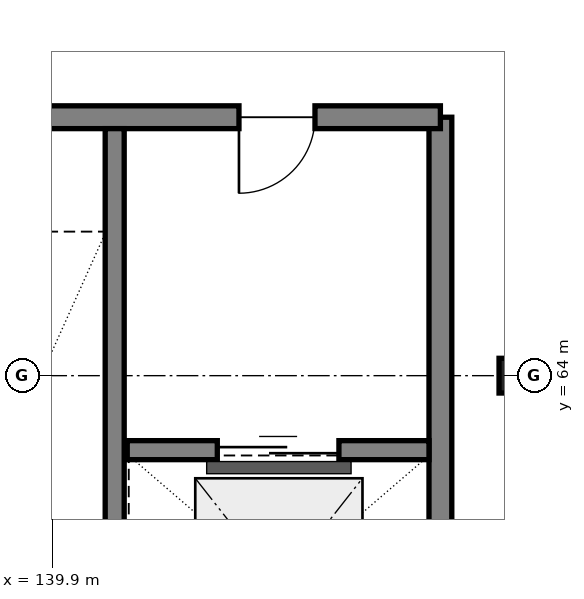
"""IFC4 building model, lengths in metres.
Left out: names, types, materials, properties, quantities, classifications, styles, units other than length and angle.
Written with IfcOpenShell. Run it as: python <this file> out.ifc"""

import sys

from ifc_helpers import new_model, si_unit, direction, frame, frame_2d, origin, origin_2d_with_axis, place, context, subcontext, project, spatial, rectangle, hollow_circle, extrude, element, fill, save


model = new_model("IFC4")
c1 = context("Model", 3, precision=1e-05, world=origin(), true_north=direction((0.0, 1.0)))
c2 = subcontext(c1, "Body", "Model", "MODEL_VIEW")
j1 = project(units=[si_unit("LENGTHUNIT", "METRE"), si_unit("PLANEANGLEUNIT", "RADIAN")], contexts=[c1])
p1 = place(None, origin())
s1 = spatial("IfcSite", under=j1, at=p1, CompositionType="ELEMENT")
p2 = place(p1, origin())
s2 = spatial("IfcBuilding", under=s1, at=p2, CompositionType="ELEMENT")
p3 = place(p2, frame((0.0, 0.0, 8.4)))
s3 = spatial("IfcBuildingStorey", under=s2, at=p3, CompositionType="ELEMENT", Elevation=8.4)
p4 = place(p3, frame((146.0, 64.0, 0.0), z_axis=(0.0, 0.0, 1.0), x_axis=(1.0, 0.0, 0.0)))
e1 = element("IfcColumn", 1, at=p4, inside=s3, PredefinedType="COLUMN", context=c2, shape_type="SweptSolid", body=[
    extrude(hollow_circle(Radius=0.229, WallThickness=0.013, at=origin_2d_with_axis()), origin(), (0.0, 0.0, 1.0), 6.0),
])
p5 = place(p3, frame((145.0, 59.4, 0.0), z_axis=(0.0, 0.0, 1.0), x_axis=(0.0, 1.0, 0.0)))
e2 = element("IfcWall", 2, at=p5, inside=s3, PredefinedType="SHEAR", context=c2, shape_type="SweptSolid", body=[
    extrude(rectangle(XDim=8.0, YDim=0.3, at=frame_2d((4.0, 0.0), x_axis=(1.0, 0.0))), origin(), (0.0, 0.0, 1.0), 3.36),
])
p6 = place(p3, frame((145.0, 67.4, 0.0), z_axis=(0.0, 0.0, 1.0), x_axis=(-1.0, 0.0, 0.0)))
e3 = element("IfcWall", 3, at=p6, inside=s3, PredefinedType="SHEAR", context=c2, shape_type="SweptSolid", body=[
    extrude(rectangle(XDim=7.4, YDim=0.3, at=frame_2d((3.7, 0.0), x_axis=(1.0, 0.0))), origin(), (0.0, 0.0, 1.0), 3.36),
])
p7 = place(p6, frame((1.65, 0.0, 0.0)))
e4 = element("IfcOpeningElement", 4, at=p7, cuts=e3, PredefinedType="OPENING", context=c2, shape_type="SweptSolid", body=[
    extrude(rectangle(XDim=1.0, YDim=2.15, at=frame_2d((0.5, 1.075), x_axis=(1.0, 0.0))), frame((0.0, 0.16, 0.0), z_axis=(0.0, -1.0, 0.0), x_axis=(1.0, 0.0, 0.0)), (0.0, 0.0, 1.0), 0.32),
])
p8 = place(p6, frame((5.3, 0.0, 0.0)))
e5 = element("IfcOpeningElement", 5, at=p8, cuts=e3, PredefinedType="OPENING", context=c2, shape_type="SweptSolid", body=[
    extrude(rectangle(XDim=1.0, YDim=2.15, at=frame_2d((0.5, 1.075), x_axis=(1.0, 0.0))), frame((0.0, 0.16, 0.0), z_axis=(0.0, -1.0, 0.0), x_axis=(1.0, 0.0, 0.0)), (0.0, 0.0, 1.0), 0.32),
])
p9 = place(p3, frame((140.715, 59.55, 0.0), z_axis=(0.0, 0.0, 1.0), x_axis=(0.0, 1.0, 0.0)))
e6 = element("IfcWall", 6, at=p9, inside=s3, PredefinedType="SHEAR", context=c2, shape_type="SweptSolid", body=[
    extrude(rectangle(XDim=7.7, YDim=0.25, at=frame_2d((3.85, 0.0), x_axis=(1.0, 0.0))), origin(), (0.0, 0.0, 1.0), 3.36),
])
p10 = place(p3, frame((140.88, 63.02, 0.0), z_axis=(0.0, 0.0, 1.0), x_axis=(1.0, 0.0, 0.0)))
e7 = element("IfcWall", 7, at=p10, inside=s3, PredefinedType="SHEAR", context=c2, shape_type="SweptSolid", body=[
    extrude(rectangle(XDim=3.97, YDim=0.25, at=frame_2d((1.985, 0.0), x_axis=(1.0, 0.0))), origin(), (0.0, 0.0, 1.0), 3.36),
])
p11 = place(p10, frame((1.185, 0.0, 0.0)))
e8 = element("IfcOpeningElement", 8, at=p11, cuts=e7, PredefinedType="OPENING", context=c2, shape_type="SweptSolid", body=[
    extrude(rectangle(XDim=1.6, YDim=2.3, at=frame_2d((0.8, 1.15), x_axis=(1.0, 0.0))), frame((0.0, 0.135, 0.0), z_axis=(0.0, -1.0, 0.0), x_axis=(1.0, 0.0, 0.0)), (0.0, 0.0, 1.0), 0.27),
])
p12 = place(p7, origin())
e9 = element("IfcDoor", 9, at=p12, inside=s3, OperationType="SINGLE_SWING_RIGHT", PredefinedType="DOOR", context=c2, shape_type="SweptSolid", body=[
    extrude(rectangle(XDim=1.0, YDim=2.15, at=frame_2d((0.5, 1.075), x_axis=(1.0, 0.0))), frame((0.0, 0.025, 0.0), z_axis=(0.0, -1.0, 0.0), x_axis=(1.0, 0.0, 0.0)), (0.0, 0.0, 1.0), 0.05),
])
fill(e4, e9)
p13 = place(p11, origin())
e10 = element("IfcDoor", 10, at=p13, inside=s3, OperationType="SLIDING_TO_RIGHT", PredefinedType="DOOR", context=c2, shape_type="SweptSolid", body=[
    extrude(rectangle(XDim=1.6, YDim=2.3, at=frame_2d((0.8, 1.15), x_axis=(1.0, 0.0))), frame((0.0, 0.025, 0.0), z_axis=(0.0, -1.0, 0.0), x_axis=(1.0, 0.0, 0.0)), (0.0, 0.0, 1.0), 0.05),
])
fill(e8, e10)
save(model, sys.argv[1])
